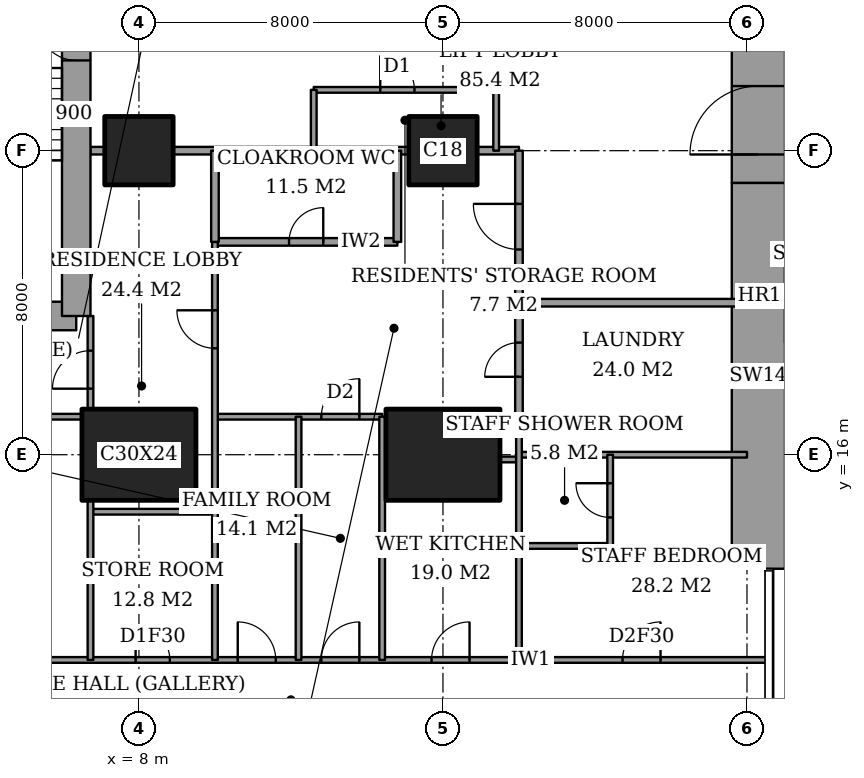
"""IFC4 building model, lengths in metres.
Left out: names, types, materials, properties, quantities, classifications, styles, units other than length and angle.
Written with IfcOpenShell. Run it as: python <this file> out.ifc"""

import sys

from ifc_helpers import new_model, si_unit, direction, frame, frame_2d, origin, origin_2d, place, context, subcontext, project, spatial, rectangle, extrude, element, fill, save


model = new_model("IFC4")
c1 = context("Model", 3, precision=1e-05, world=origin(), true_north=direction((0.0, 1.0)))
c2 = subcontext(c1, "Body", "Model", "MODEL_VIEW")
j1 = project(units=[si_unit("LENGTHUNIT", "METRE"), si_unit("PLANEANGLEUNIT", "RADIAN")], contexts=[c1])
p1 = place(None, origin())
s1 = spatial("IfcSite", under=j1, at=p1, CompositionType="ELEMENT")
p2 = place(p1, origin())
s2 = spatial("IfcBuilding", under=s1, at=p2, CompositionType="ELEMENT")
p3 = place(p2, frame((0.0, 0.0, 207.4)))
s3 = spatial("IfcBuildingStorey", under=s2, at=p3, CompositionType="ELEMENT", Elevation=207.4)
p4 = place(p3, frame((8.0, 16.0, 0.0), z_axis=(0.0, 0.0, 1.0), x_axis=(1.0, 0.0, 0.0)))
e1 = element("IfcColumn", 1, at=p4, inside=s3, PredefinedType="COLUMN", context=c2, shape_type="SweptSolid", body=[
    extrude(rectangle(XDim=3.0, YDim=2.4, at=origin_2d()), origin(), (0.0, 0.0, 1.0), 3.6),
])
p5 = place(p3, frame((8.0, 24.0, 0.0), z_axis=(0.0, 0.0, 1.0), x_axis=(1.0, 0.0, 0.0)))
e2 = element("IfcColumn", 2, at=p5, inside=s3, PredefinedType="COLUMN", context=c2, shape_type="SweptSolid", body=[
    extrude(rectangle(XDim=1.8, YDim=1.8, at=origin_2d()), origin(), (0.0, 0.0, 1.0), 3.6),
])
p6 = place(p3, frame((16.0, 16.0, 0.0), z_axis=(0.0, 0.0, 1.0), x_axis=(1.0, 0.0, 0.0)))
e3 = element("IfcColumn", 3, at=p6, inside=s3, PredefinedType="COLUMN", context=c2, shape_type="SweptSolid", body=[
    extrude(rectangle(XDim=3.0, YDim=2.4, at=origin_2d()), origin(), (0.0, 0.0, 1.0), 3.6),
])
p7 = place(p3, frame((16.0, 24.0, 0.0), z_axis=(0.0, 0.0, 1.0), x_axis=(1.0, 0.0, 0.0)))
e4 = element("IfcColumn", 4, at=p7, inside=s3, PredefinedType="COLUMN", context=c2, shape_type="SweptSolid", body=[
    extrude(rectangle(XDim=1.8, YDim=1.8, at=origin_2d()), origin(), (0.0, 0.0, 1.0), 3.6),
])
p8 = place(p3, frame((24.3, 13.0, 0.0), z_axis=(0.0, 0.0, 1.0), x_axis=(0.0, 1.0, 0.0)))
e5 = element("IfcWall", 5, at=p8, inside=s3, PredefinedType="SHEAR", context=c2, shape_type="SweptSolid", body=[
    extrude(rectangle(XDim=10.15, YDim=1.4, at=frame_2d((5.075, 0.0))), origin(), (0.0, 0.0, 1.0), 3.6),
])
p9 = place(p3, frame((24.3, 23.15, 0.0), z_axis=(0.0, 0.0, 1.0), x_axis=(0.0, 1.0, 0.0)))
e6 = element("IfcWall", 6, at=p9, inside=s3, PredefinedType="SHEAR", context=c2, shape_type="SweptSolid", body=[
    extrude(rectangle(XDim=11.85, YDim=1.4, at=frame_2d((5.925, 0.0))), origin(), (0.0, 0.0, 1.0), 3.6),
])
p10 = place(p9, frame((0.75, 0.0, 0.0)))
e7 = element("IfcOpeningElement", 7, at=p10, cuts=e6, PredefinedType="OPENING", context=c2, shape_type="SweptSolid", body=[
    extrude(rectangle(XDim=1.8, YDim=2.4, at=frame_2d((0.9, 1.2))), frame((0.0, 0.71, 0.0), z_axis=(0.0, -1.0, 0.0), x_axis=(1.0, 0.0, 0.0)), (0.0, 0.0, 1.0), 1.42),
])
p11 = place(p3, frame((1.9, 19.65, 0.0), z_axis=(0.0, 0.0, 1.0), x_axis=(1.0, 0.0, 0.0)))
e8 = element("IfcWall", 8, at=p11, inside=s3, PredefinedType="SHEAR", context=c2, shape_type="SweptSolid", body=[
    extrude(rectangle(XDim=4.45, YDim=0.75, at=frame_2d((2.225, 0.0))), origin(), (0.0, 0.0, 1.0), 3.6),
])
p12 = place(p3, frame((6.35, 19.65, 0.0), z_axis=(0.0, 0.0, 1.0), x_axis=(0.0, 1.0, 0.0)))
e9 = element("IfcWall", 9, at=p12, inside=s3, PredefinedType="SHEAR", context=c2, shape_type="SweptSolid", body=[
    extrude(rectangle(XDim=8.7, YDim=0.75, at=frame_2d((4.35, 0.0))), origin(), (0.0, 0.0, 1.0), 3.6),
])
p13 = place(p12, frame((6.725, 0.0, 0.0)))
e10 = element("IfcOpeningElement", 10, at=p13, cuts=e9, PredefinedType="OPENING", context=c2, shape_type="SweptSolid", body=[
    extrude(rectangle(XDim=1.0, YDim=2.1, at=frame_2d((0.5, 1.05))), frame((0.0, 0.385, 0.0), z_axis=(0.0, -1.0, 0.0), x_axis=(1.0, 0.0, 0.0)), (0.0, 0.0, 1.0), 0.77),
])
p14 = place(p3, frame((-0.45, 10.6, 0.0), z_axis=(0.0, 0.0, 1.0), x_axis=(1.0, 0.0, 0.0)))
e11 = element("IfcWall", 11, at=p14, inside=s3, PredefinedType="PARTITIONING", context=c2, shape_type="SweptSolid", body=[
    extrude(rectangle(XDim=25.011, YDim=0.15, at=frame_2d((12.505, 0.0))), origin(), (0.0, 0.0, 1.0), 3.35),
])
p15 = place(p14, frame((13.25, 0.0, 0.0)))
e12 = element("IfcOpeningElement", 12, at=p15, cuts=e11, PredefinedType="OPENING", context=c2, shape_type="SweptSolid", body=[
    extrude(rectangle(XDim=1.0, YDim=2.1, at=frame_2d((0.5, 1.05))), frame((0.0, 0.085, 0.0), z_axis=(0.0, -1.0, 0.0), x_axis=(1.0, 0.0, 0.0)), (0.0, 0.0, 1.0), 0.17),
])
p16 = place(p14, frame((3.087, 0.0, 0.0)))
e13 = element("IfcOpeningElement", 13, at=p16, cuts=e11, PredefinedType="OPENING", context=c2, shape_type="SweptSolid", body=[
    extrude(rectangle(XDim=1.0, YDim=2.1, at=frame_2d((0.5, 1.05))), frame((0.0, 0.085, 0.0), z_axis=(0.0, -1.0, 0.0), x_axis=(1.0, 0.0, 0.0)), (0.0, 0.0, 1.0), 0.17),
])
p17 = place(p14, frame((8.363, 0.0, 0.0)))
e14 = element("IfcOpeningElement", 14, at=p17, cuts=e11, PredefinedType="OPENING", context=c2, shape_type="SweptSolid", body=[
    extrude(rectangle(XDim=0.9, YDim=2.1, at=frame_2d((0.45, 1.05))), frame((0.0, 0.085, 0.0), z_axis=(0.0, -1.0, 0.0), x_axis=(1.0, 0.0, 0.0)), (0.0, 0.0, 1.0), 0.17),
])
p18 = place(p14, frame((11.05, 0.0, 0.0)))
e15 = element("IfcOpeningElement", 15, at=p18, cuts=e11, PredefinedType="OPENING", context=c2, shape_type="SweptSolid", body=[
    extrude(rectangle(XDim=1.0, YDim=2.1, at=frame_2d((0.5, 1.05))), frame((0.0, 0.085, 0.0), z_axis=(0.0, -1.0, 0.0), x_axis=(1.0, 0.0, 0.0)), (0.0, 0.0, 1.0), 0.17),
])
p19 = place(p14, frame((16.15, 0.0, 0.0)))
e16 = element("IfcOpeningElement", 16, at=p19, cuts=e11, PredefinedType="OPENING", context=c2, shape_type="SweptSolid", body=[
    extrude(rectangle(XDim=1.0, YDim=2.1, at=frame_2d((0.5, 1.05))), frame((0.0, 0.085, 0.0), z_axis=(0.0, -1.0, 0.0), x_axis=(1.0, 0.0, 0.0)), (0.0, 0.0, 1.0), 0.17),
])
p20 = place(p14, frame((21.175, 0.0, 0.0)))
e17 = element("IfcOpeningElement", 17, at=p20, cuts=e11, PredefinedType="OPENING", context=c2, shape_type="SweptSolid", body=[
    extrude(rectangle(XDim=1.0, YDim=2.1, at=frame_2d((0.5, 1.05))), frame((0.0, 0.085, 0.0), z_axis=(0.0, -1.0, 0.0), x_axis=(1.0, 0.0, 0.0)), (0.0, 0.0, 1.0), 0.17),
])
p21 = place(p3, frame((18.0, 13.6, 0.0), z_axis=(0.0, 0.0, 1.0), x_axis=(1.0, 0.0, 0.0)))
e18 = element("IfcWall", 18, at=p21, inside=s3, PredefinedType="PARTITIONING", context=c2, shape_type="SweptSolid", body=[
    extrude(rectangle(XDim=2.4, YDim=0.15, at=frame_2d((1.2, 0.0))), origin(), (0.0, 0.0, 1.0), 3.35),
])
p22 = place(p3, frame((6.725, 14.5, 0.0), z_axis=(0.0, 0.0, 1.0), x_axis=(1.0, 0.0, 0.0)))
e19 = element("IfcWall", 19, at=p22, inside=s3, PredefinedType="PARTITIONING", context=c2, shape_type="SweptSolid", body=[
    extrude(rectangle(XDim=3.275, YDim=0.15, at=frame_2d((1.637, 0.0))), origin(), (0.0, 0.0, 1.0), 3.35),
])
p23 = place(p3, frame((17.5, 15.875, 0.0), z_axis=(0.0, 0.0, 1.0), x_axis=(1.0, 0.0, 0.0)))
e20 = element("IfcWall", 20, at=p23, inside=s3, PredefinedType="PARTITIONING", context=c2, shape_type="SweptSolid", body=[
    extrude(rectangle(XDim=0.5, YDim=0.15, at=frame_2d((0.25, 0.0))), origin(), (0.0, 0.0, 1.0), 2.634),
])
p24 = place(p3, frame((18.0, 16.0, 0.0), z_axis=(0.0, 0.0, 1.0), x_axis=(1.0, 0.0, 0.0)))
e21 = element("IfcWall", 21, at=p24, inside=s3, PredefinedType="PARTITIONING", context=c2, shape_type="SweptSolid", body=[
    extrude(rectangle(XDim=6.0, YDim=0.15, at=frame_2d((3.0, 0.0))), origin(), (0.0, 0.0, 1.0), 2.634),
])
p25 = place(p3, frame((-0.45, 17.0, 0.0), z_axis=(0.0, 0.0, 1.0), x_axis=(1.0, 0.0, 0.0)))
e22 = element("IfcWall", 22, at=p25, inside=s3, PredefinedType="PARTITIONING", context=c2, shape_type="SweptSolid", body=[
    extrude(rectangle(XDim=6.95, YDim=0.15, at=frame_2d((3.475, 0.0))), origin(), (0.0, 0.0, 1.0), 3.35),
])
p26 = place(p3, frame((10.0, 17.0, 0.0), z_axis=(0.0, 0.0, 1.0), x_axis=(1.0, 0.0, 0.0)))
e23 = element("IfcWall", 23, at=p26, inside=s3, PredefinedType="PARTITIONING", context=c2, shape_type="SweptSolid", body=[
    extrude(rectangle(XDim=4.4, YDim=0.15, at=frame_2d((2.2, 0.0))), origin(), (0.0, 0.0, 1.0), 3.35),
])
p27 = place(p26, frame((2.8, 0.0, 0.0)))
e24 = element("IfcOpeningElement", 24, at=p27, cuts=e23, PredefinedType="OPENING", context=c2, shape_type="SweptSolid", body=[
    extrude(rectangle(XDim=1.0, YDim=2.1, at=frame_2d((0.5, 1.05))), frame((0.0, 0.085, 0.0), z_axis=(0.0, -1.0, 0.0), x_axis=(1.0, 0.0, 0.0)), (0.0, 0.0, 1.0), 0.17),
])
p28 = place(p3, frame((18.0, 20.0, 0.0), z_axis=(0.0, 0.0, 1.0), x_axis=(1.0, 0.0, 0.0)))
e25 = element("IfcWall", 25, at=p28, inside=s3, PredefinedType="PARTITIONING", context=c2, shape_type="SweptSolid", body=[
    extrude(rectangle(XDim=6.0, YDim=0.2, at=frame_2d((3.0, 0.0))), origin(), (0.0, 0.0, 1.0), 3.35),
])
p29 = place(p3, frame((10.0, 21.6, 0.0), z_axis=(0.0, 0.0, 1.0), x_axis=(1.0, 0.0, 0.0)))
e26 = element("IfcWall", 26, at=p29, inside=s3, PredefinedType="PARTITIONING", context=c2, shape_type="SweptSolid", body=[
    extrude(rectangle(XDim=4.8, YDim=0.2, at=frame_2d((2.4, 0.0))), origin(), (0.0, 0.0, 1.0), 3.35),
])
p30 = place(p29, frame((1.95, 0.0, 0.0)))
e27 = element("IfcOpeningElement", 27, at=p30, cuts=e26, PredefinedType="OPENING", context=c2, shape_type="SweptSolid", body=[
    extrude(rectangle(XDim=0.9, YDim=2.1, at=frame_2d((0.45, 1.05))), frame((0.0, 0.11, 0.0), z_axis=(0.0, -1.0, 0.0), x_axis=(1.0, 0.0, 0.0)), (0.0, 0.0, 1.0), 0.22),
])
p31 = place(p3, frame((6.725, 24.0, 0.0), z_axis=(0.0, 0.0, 1.0), x_axis=(1.0, 0.0, 0.0)))
e28 = element("IfcWall", 28, at=p31, inside=s3, PredefinedType="PARTITIONING", context=c2, shape_type="SweptSolid", body=[
    extrude(rectangle(XDim=0.375, YDim=0.2, at=frame_2d((0.188, 0.0))), origin(), (0.0, 0.0, 1.0), 3.35),
])
p32 = place(p3, frame((8.9, 24.0, 0.0), z_axis=(0.0, 0.0, 1.0), x_axis=(1.0, 0.0, 0.0)))
e29 = element("IfcWall", 29, at=p32, inside=s3, PredefinedType="PARTITIONING", context=c2, shape_type="SweptSolid", body=[
    extrude(rectangle(XDim=6.2, YDim=0.2, at=frame_2d((3.1, 0.0))), origin(), (0.0, 0.0, 1.0), 3.35),
])
p33 = place(p3, frame((16.9, 24.0, 0.0), z_axis=(0.0, 0.0, 1.0), x_axis=(1.0, 0.0, 0.0)))
e30 = element("IfcWall", 30, at=p33, inside=s3, PredefinedType="PARTITIONING", context=c2, shape_type="SweptSolid", body=[
    extrude(rectangle(XDim=1.1, YDim=0.2, at=frame_2d((0.55, 0.0))), origin(), (0.0, 0.0, 1.0), 3.35),
])
p34 = place(p3, frame((12.6, 25.6, 0.0), z_axis=(0.0, 0.0, 1.0), x_axis=(1.0, 0.0, 0.0)))
e31 = element("IfcWall", 31, at=p34, inside=s3, PredefinedType="PARTITIONING", context=c2, shape_type="SweptSolid", body=[
    extrude(rectangle(XDim=4.8, YDim=0.15, at=frame_2d((2.4, 0.0))), origin(), (0.0, 0.0, 1.0), 3.35),
])
p35 = place(p34, frame((1.75, 0.0, 0.0)))
e32 = element("IfcOpeningElement", 32, at=p35, cuts=e31, PredefinedType="OPENING", context=c2, shape_type="SweptSolid", body=[
    extrude(rectangle(XDim=0.9, YDim=2.1, at=frame_2d((0.45, 1.05))), frame((0.0, 0.085, 0.0), z_axis=(0.0, -1.0, 0.0), x_axis=(1.0, 0.0, 0.0)), (0.0, 0.0, 1.0), 0.17),
])
p36 = place(p3, frame((6.725, 10.6, 0.0), z_axis=(0.0, 0.0, 1.0), x_axis=(0.0, 1.0, 0.0)))
e33 = element("IfcWall", 33, at=p36, inside=s3, PredefinedType="PARTITIONING", context=c2, shape_type="SweptSolid", body=[
    extrude(rectangle(XDim=4.2, YDim=0.15, at=frame_2d((2.1, 0.0))), origin(), (0.0, 0.0, 1.0), 3.35),
])
p37 = place(p3, frame((6.725, 17.2, 0.0), z_axis=(0.0, 0.0, 1.0), x_axis=(0.0, 1.0, 0.0)))
e34 = element("IfcWall", 34, at=p37, inside=s3, PredefinedType="PARTITIONING", context=c2, shape_type="SweptSolid", body=[
    extrude(rectangle(XDim=2.45, YDim=0.15, at=frame_2d((1.225, 0.0))), origin(), (0.0, 0.0, 1.0), 3.35),
])
p38 = place(p37, frame((0.538, 0.0, 0.0)))
e35 = element("IfcOpeningElement", 35, at=p38, cuts=e34, PredefinedType="OPENING", context=c2, shape_type="SweptSolid", body=[
    extrude(rectangle(XDim=1.0, YDim=2.1, at=frame_2d((0.5, 1.05))), frame((0.0, 0.085, 0.0), z_axis=(0.0, -1.0, 0.0), x_axis=(1.0, 0.0, 0.0)), (0.0, 0.0, 1.0), 0.17),
])
p39 = place(p3, frame((10.0, 21.6, 0.0), z_axis=(0.0, 0.0, 1.0), x_axis=(0.0, 1.0, 0.0)))
e36 = element("IfcWall", 36, at=p39, inside=s3, PredefinedType="PARTITIONING", context=c2, shape_type="SweptSolid", body=[
    extrude(rectangle(XDim=2.4, YDim=0.2, at=frame_2d((1.2, 0.0))), origin(), (0.0, 0.0, 1.0), 3.35),
])
p40 = place(p3, frame((10.0, 10.6, 0.0), z_axis=(0.0, 0.0, 1.0), x_axis=(0.0, 1.0, 0.0)))
e37 = element("IfcWall", 37, at=p40, inside=s3, PredefinedType="PARTITIONING", context=c2, shape_type="SweptSolid", body=[
    extrude(rectangle(XDim=11.0, YDim=0.15, at=frame_2d((5.5, 0.0))), origin(), (0.0, 0.0, 1.0), 3.35),
])
p41 = place(p40, frame((8.2, 0.0, 0.0)))
e38 = element("IfcOpeningElement", 38, at=p41, cuts=e37, PredefinedType="OPENING", context=c2, shape_type="SweptSolid", body=[
    extrude(rectangle(XDim=1.0, YDim=2.1, at=frame_2d((0.5, 1.05))), frame((0.0, 0.085, 0.0), z_axis=(0.0, -1.0, 0.0), x_axis=(1.0, 0.0, 0.0)), (0.0, 0.0, 1.0), 0.17),
])
p42 = place(p3, frame((12.2, 10.6, 0.0), z_axis=(0.0, 0.0, 1.0), x_axis=(0.0, 1.0, 0.0)))
e39 = element("IfcWall", 39, at=p42, inside=s3, PredefinedType="PARTITIONING", context=c2, shape_type="SweptSolid", body=[
    extrude(rectangle(XDim=6.4, YDim=0.15, at=frame_2d((3.2, 0.0))), origin(), (0.0, 0.0, 1.0), 3.35),
])
p43 = place(p3, frame((12.6, 24.0, 0.0), z_axis=(0.0, 0.0, 1.0), x_axis=(0.0, 1.0, 0.0)))
e40 = element("IfcWall", 40, at=p43, inside=s3, PredefinedType="PARTITIONING", context=c2, shape_type="SweptSolid", body=[
    extrude(rectangle(XDim=1.6, YDim=0.15, at=frame_2d((0.8, 0.0))), origin(), (0.0, 0.0, 1.0), 3.35),
])
p44 = place(p3, frame((14.4, 10.6, 0.0), z_axis=(0.0, 0.0, 1.0), x_axis=(0.0, 1.0, 0.0)))
e41 = element("IfcWall", 41, at=p44, inside=s3, PredefinedType="PARTITIONING", context=c2, shape_type="SweptSolid", body=[
    extrude(rectangle(XDim=6.4, YDim=0.15, at=frame_2d((3.2, 0.0))), origin(), (0.0, 0.0, 1.0), 3.35),
])
p45 = place(p3, frame((14.8, 21.6, 0.0), z_axis=(0.0, 0.0, 1.0), x_axis=(0.0, 1.0, 0.0)))
e42 = element("IfcWall", 42, at=p45, inside=s3, PredefinedType="PARTITIONING", context=c2, shape_type="SweptSolid", body=[
    extrude(rectangle(XDim=2.4, YDim=0.2, at=frame_2d((1.2, 0.0))), origin(), (0.0, 0.0, 1.0), 3.35),
])
p46 = place(p3, frame((17.4, 24.0, 0.0), z_axis=(0.0, 0.0, 1.0), x_axis=(0.0, 1.0, 0.0)))
e43 = element("IfcWall", 43, at=p46, inside=s3, PredefinedType="PARTITIONING", context=c2, shape_type="SweptSolid", body=[
    extrude(rectangle(XDim=1.6, YDim=0.15, at=frame_2d((0.8, 0.0))), origin(), (0.0, 0.0, 1.0), 3.35),
])
p47 = place(p3, frame((18.0, 17.0, 0.0), z_axis=(0.0, 0.0, 1.0), x_axis=(0.0, 1.0, 0.0)))
e44 = element("IfcWall", 44, at=p47, inside=s3, PredefinedType="PARTITIONING", context=c2, shape_type="SweptSolid", body=[
    extrude(rectangle(XDim=7.0, YDim=0.2, at=frame_2d((3.5, 0.0))), origin(), (0.0, 0.0, 1.0), 3.35),
])
p48 = place(p47, frame((4.4, 0.0, 0.0)))
e45 = element("IfcOpeningElement", 45, at=p48, cuts=e44, PredefinedType="OPENING", context=c2, shape_type="SweptSolid", body=[
    extrude(rectangle(XDim=1.2, YDim=2.4, at=frame_2d((0.6, 1.2))), frame((0.0, 0.11, 0.0), z_axis=(0.0, -1.0, 0.0), x_axis=(1.0, 0.0, 0.0)), (0.0, 0.0, 1.0), 0.22),
])
p49 = place(p47, frame((1.05, 0.0, 0.0)))
e46 = element("IfcOpeningElement", 46, at=p49, cuts=e44, PredefinedType="OPENING", context=c2, shape_type="SweptSolid", body=[
    extrude(rectangle(XDim=0.9, YDim=2.1, at=frame_2d((0.45, 1.05))), frame((0.0, 0.11, 0.0), z_axis=(0.0, -1.0, 0.0), x_axis=(1.0, 0.0, 0.0)), (0.0, 0.0, 1.0), 0.22),
])
p50 = place(p3, frame((18.0, 10.6, 0.0), z_axis=(0.0, 0.0, 1.0), x_axis=(0.0, 1.0, 0.0)))
e47 = element("IfcWall", 47, at=p50, inside=s3, PredefinedType="PARTITIONING", context=c2, shape_type="SweptSolid", body=[
    extrude(rectangle(XDim=6.4, YDim=0.15, at=frame_2d((3.2, 0.0))), origin(), (0.0, 0.0, 1.0), 3.35),
])
p51 = place(p3, frame((20.4, 13.6, 0.0), z_axis=(0.0, 0.0, 1.0), x_axis=(0.0, 1.0, 0.0)))
e48 = element("IfcWall", 48, at=p51, inside=s3, PredefinedType="PARTITIONING", context=c2, shape_type="SweptSolid", body=[
    extrude(rectangle(XDim=2.4, YDim=0.15, at=frame_2d((1.2, 0.0))), origin(), (0.0, 0.0, 1.0), 3.35),
])
p52 = place(p51, frame((0.75, 0.0, 0.0)))
e49 = element("IfcOpeningElement", 49, at=p52, cuts=e48, PredefinedType="OPENING", context=c2, shape_type="SweptSolid", body=[
    extrude(rectangle(XDim=0.9, YDim=2.1, at=frame_2d((0.45, 1.05))), frame((0.0, 0.085, 0.0), z_axis=(0.0, -1.0, 0.0), x_axis=(1.0, 0.0, 0.0)), (0.0, 0.0, 1.0), 0.17),
])
p53 = place(p15, origin())
e50 = element("IfcDoor", 50, at=p53, inside=s3, OperationType="SINGLE_SWING_LEFT", PredefinedType="DOOR", context=c2, shape_type="SweptSolid", body=[
    extrude(rectangle(XDim=1.0, YDim=2.1, at=frame_2d((0.5, 1.05))), frame((0.0, 0.025, 0.0), z_axis=(0.0, -1.0, 0.0), x_axis=(1.0, 0.0, 0.0)), (0.0, 0.0, 1.0), 0.05),
])
fill(e12, e50)
p54 = place(p38, origin())
e51 = element("IfcDoor", 51, at=p54, inside=s3, OperationType="SINGLE_SWING_RIGHT", PredefinedType="DOOR", context=c2, shape_type="SweptSolid", body=[
    extrude(rectangle(XDim=1.0, YDim=2.1, at=frame_2d((0.5, 1.05))), frame((0.0, 0.025, 0.0), z_axis=(0.0, -1.0, 0.0), x_axis=(1.0, 0.0, 0.0)), (0.0, 0.0, 1.0), 0.05),
])
fill(e35, e51)
p55 = place(p17, origin())
e52 = element("IfcDoor", 52, at=p55, inside=s3, OperationType="SINGLE_SWING_RIGHT", PredefinedType="DOOR", context=c2, shape_type="SweptSolid", body=[
    extrude(rectangle(XDim=0.9, YDim=2.1, at=frame_2d((0.45, 1.05))), frame((0.0, 0.025, 0.0), z_axis=(0.0, -1.0, 0.0), x_axis=(1.0, 0.0, 0.0)), (0.0, 0.0, 1.0), 0.05),
])
fill(e14, e52)
p56 = place(p41, origin())
e53 = element("IfcDoor", 53, at=p56, inside=s3, OperationType="SINGLE_SWING_LEFT", PredefinedType="DOOR", context=c2, shape_type="SweptSolid", body=[
    extrude(rectangle(XDim=1.0, YDim=2.1, at=frame_2d((0.5, 1.05))), frame((0.0, 0.025, 0.0), z_axis=(0.0, -1.0, 0.0), x_axis=(1.0, 0.0, 0.0)), (0.0, 0.0, 1.0), 0.05),
])
fill(e38, e53)
p57 = place(p30, origin())
e54 = element("IfcDoor", 54, at=p57, inside=s3, OperationType="SINGLE_SWING_LEFT", PredefinedType="DOOR", context=c2, shape_type="SweptSolid", body=[
    extrude(rectangle(XDim=0.9, YDim=2.1, at=frame_2d((0.45, 1.05))), frame((0.0, 0.025, 0.0), z_axis=(0.0, -1.0, 0.0), x_axis=(1.0, 0.0, 0.0)), (0.0, 0.0, 1.0), 0.05),
])
fill(e27, e54)
p58 = place(p48, origin())
e55 = element("IfcDoor", 55, at=p58, inside=s3, OperationType="SINGLE_SWING_LEFT", PredefinedType="DOOR", context=c2, shape_type="SweptSolid", body=[
    extrude(rectangle(XDim=1.2, YDim=2.4, at=frame_2d((0.6, 1.2))), frame((0.0, 0.025, 0.0), z_axis=(0.0, -1.0, 0.0), x_axis=(1.0, 0.0, 0.0)), (0.0, 0.0, 1.0), 0.05),
])
fill(e45, e55)
p59 = place(p18, origin())
e56 = element("IfcDoor", 56, at=p59, inside=s3, OperationType="SINGLE_SWING_RIGHT", PredefinedType="DOOR", context=c2, shape_type="SweptSolid", body=[
    extrude(rectangle(XDim=1.0, YDim=2.1, at=frame_2d((0.5, 1.05))), frame((0.0, 0.025, 0.0), z_axis=(0.0, -1.0, 0.0), x_axis=(1.0, 0.0, 0.0)), (0.0, 0.0, 1.0), 0.05),
])
fill(e15, e56)
p60 = place(p27, origin())
e57 = element("IfcDoor", 57, at=p60, inside=s3, OperationType="SINGLE_SWING_LEFT", PredefinedType="DOOR", context=c2, shape_type="SweptSolid", body=[
    extrude(rectangle(XDim=1.0, YDim=2.1, at=frame_2d((0.5, 1.05))), frame((0.0, 0.025, 0.0), z_axis=(0.0, -1.0, 0.0), x_axis=(1.0, 0.0, 0.0)), (0.0, 0.0, 1.0), 0.05),
])
fill(e24, e57)
p61 = place(p19, origin())
e58 = element("IfcDoor", 58, at=p61, inside=s3, OperationType="SINGLE_SWING_LEFT", PredefinedType="DOOR", context=c2, shape_type="SweptSolid", body=[
    extrude(rectangle(XDim=1.0, YDim=2.1, at=frame_2d((0.5, 1.05))), frame((0.0, 0.025, 0.0), z_axis=(0.0, -1.0, 0.0), x_axis=(1.0, 0.0, 0.0)), (0.0, 0.0, 1.0), 0.05),
])
fill(e16, e58)
p62 = place(p52, origin())
e59 = element("IfcDoor", 59, at=p62, inside=s3, OperationType="SINGLE_SWING_LEFT", PredefinedType="DOOR", context=c2, shape_type="SweptSolid", body=[
    extrude(rectangle(XDim=0.9, YDim=2.1, at=frame_2d((0.45, 1.05))), frame((0.0, 0.025, 0.0), z_axis=(0.0, -1.0, 0.0), x_axis=(1.0, 0.0, 0.0)), (0.0, 0.0, 1.0), 0.05),
])
fill(e49, e59)
p63 = place(p20, origin())
e60 = element("IfcDoor", 60, at=p63, inside=s3, OperationType="SINGLE_SWING_LEFT", PredefinedType="DOOR", context=c2, shape_type="SweptSolid", body=[
    extrude(rectangle(XDim=1.0, YDim=2.1, at=frame_2d((0.5, 1.05))), frame((0.0, 0.025, 0.0), z_axis=(0.0, -1.0, 0.0), x_axis=(1.0, 0.0, 0.0)), (0.0, 0.0, 1.0), 0.05),
])
fill(e17, e60)
p64 = place(p49, origin())
e61 = element("IfcDoor", 61, at=p64, inside=s3, OperationType="SINGLE_SWING_RIGHT", PredefinedType="DOOR", context=c2, shape_type="SweptSolid", body=[
    extrude(rectangle(XDim=0.9, YDim=2.1, at=frame_2d((0.45, 1.05))), frame((0.0, 0.025, 0.0), z_axis=(0.0, -1.0, 0.0), x_axis=(1.0, 0.0, 0.0)), (0.0, 0.0, 1.0), 0.05),
])
fill(e46, e61)
p65 = place(p35, origin())
e62 = element("IfcDoor", 62, at=p65, inside=s3, OperationType="SINGLE_SWING_RIGHT", PredefinedType="DOOR", context=c2, shape_type="SweptSolid", body=[
    extrude(rectangle(XDim=0.9, YDim=2.1, at=frame_2d((0.45, 1.05))), frame((0.0, 0.025, 0.0), z_axis=(0.0, -1.0, 0.0), x_axis=(1.0, 0.0, 0.0)), (0.0, 0.0, 1.0), 0.05),
])
fill(e32, e62)
p66 = place(p10, origin())
e63 = element("IfcDoor", 63, at=p66, inside=s3, OperationType="DOUBLE_DOOR_DOUBLE_SWING", PredefinedType="DOOR", context=c2, shape_type="SweptSolid", body=[
    extrude(rectangle(XDim=1.8, YDim=2.4, at=frame_2d((0.9, 1.2))), frame((0.0, 0.025, 0.0), z_axis=(0.0, -1.0, 0.0), x_axis=(1.0, 0.0, 0.0)), (0.0, 0.0, 1.0), 0.05),
])
fill(e7, e63)
p67 = place(p13, origin())
e64 = element("IfcDoor", 64, at=p67, inside=s3, OperationType="SINGLE_SWING_LEFT", PredefinedType="DOOR", context=c2, shape_type="SweptSolid", body=[
    extrude(rectangle(XDim=1.0, YDim=2.1, at=frame_2d((0.5, 1.05))), frame((0.0, 0.025, 0.0), z_axis=(0.0, -1.0, 0.0), x_axis=(1.0, 0.0, 0.0)), (0.0, 0.0, 1.0), 0.05),
])
fill(e10, e64)
save(model, sys.argv[1])
